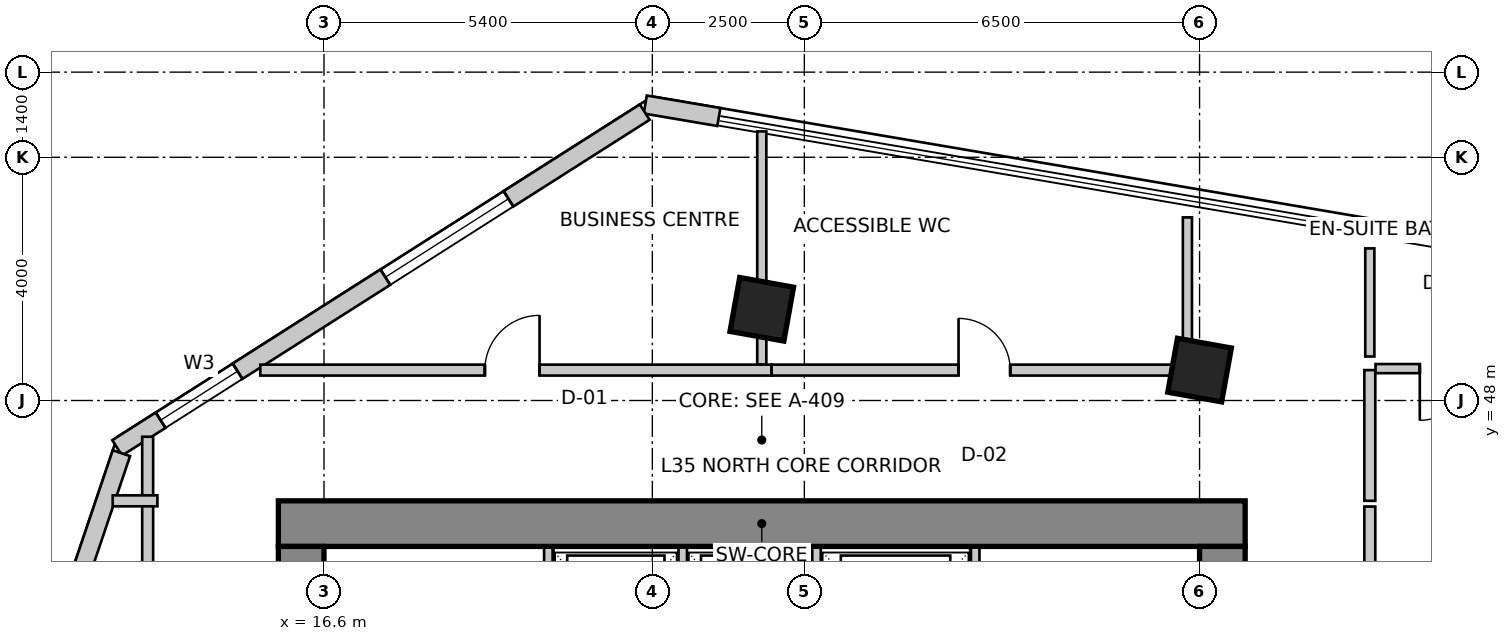
"""IFC4 building model, lengths in metres.
Left out: names, types, materials, properties, quantities, classifications, styles, units other than length and angle.
Written with IfcOpenShell. Run it as: python <this file> out.ifc"""

import sys

from ifc_helpers import new_model, si_unit, direction, frame, frame_2d, origin, origin_2d, place, context, subcontext, project, spatial, rectangle, extrude, source, transform, mapped, element, fill, save


model = new_model("IFC4")
c1 = context("Model", 3, precision=1e-05, world=origin(), true_north=direction((0.0, 1.0)))
c2 = subcontext(c1, "Body", "Model", "MODEL_VIEW")
j1 = project(units=[si_unit("LENGTHUNIT", "METRE"), si_unit("PLANEANGLEUNIT", "RADIAN")], contexts=[c1])
p1 = place(None, origin())
s1 = spatial("IfcSite", under=j1, at=p1, CompositionType="ELEMENT")
p2 = place(p1, origin())
s2 = spatial("IfcBuilding", under=s1, at=p2, CompositionType="ELEMENT")
p3 = place(p2, frame((0.0, 0.0, 143.0)))
s3 = spatial("IfcBuildingStorey", under=s2, at=p3, CompositionType="ELEMENT", Elevation=143.0)
p4 = place(p3, frame((15.85, 45.975, 0.0), z_axis=(0.0, 0.0, 1.0), x_axis=(1.0, 0.0, 0.0)))
e1 = element("IfcWall", 1, at=p4, inside=s3, PredefinedType="SHEAR", context=c2, shape_type="SweptSolid", body=[
    extrude(rectangle(XDim=15.9, YDim=0.75, at=frame_2d((7.95, 0.0))), origin(), (0.0, 0.0, 1.0), 3.6),
])
p5 = place(p3, frame((16.225, 34.2, 0.0), z_axis=(0.0, 0.0, 1.0), x_axis=(0.0, 1.0, 0.0)))
e2 = element("IfcWall", 2, at=p5, inside=s3, PredefinedType="SHEAR", context=c2, shape_type="SweptSolid", body=[
    extrude(rectangle(XDim=11.4, YDim=0.75, at=frame_2d((5.7, 0.0))), origin(), (0.0, 0.0, 1.0), 3.6),
])
m1 = source(origin(), c2, "Body", "SweptSolid", [
    extrude(rectangle(XDim=1.1, YDim=2.15, at=frame_2d((0.55, 1.075))), frame((0.0, 0.385, 0.0), z_axis=(0.0, -1.0, 0.0), x_axis=(1.0, 0.0, 0.0)), (0.0, 0.0, 1.0), 0.77),
])
p6 = place(p5, frame((7.15, 0.0, 0.0)))
e3 = element("IfcOpeningElement", 3, at=p6, cuts=e2, PredefinedType="OPENING", context=c2, shape_type="MappedRepresentation", body=[
    mapped(m1, transform((0.0, 0.0, 0.0), scale=1.0)),
])
p7 = place(p3, frame((31.375, 34.2, 0.0), z_axis=(0.0, 0.0, 1.0), x_axis=(0.0, 1.0, 0.0)))
e4 = element("IfcWall", 4, at=p7, inside=s3, PredefinedType="SHEAR", context=c2, shape_type="SweptSolid", body=[
    extrude(rectangle(XDim=11.4, YDim=0.75, at=frame_2d((5.7, 0.0))), origin(), (0.0, 0.0, 1.0), 3.6),
])
p8 = place(p7, frame((7.35, 0.0, 0.0)))
e5 = element("IfcOpeningElement", 5, at=p8, cuts=e4, PredefinedType="OPENING", context=c2, shape_type="MappedRepresentation", body=[
    mapped(m1, transform((0.0, 0.0, 0.0), scale=1.0)),
])
m2 = source(origin(), c2, "Body", "SweptSolid", [
    extrude(rectangle(XDim=0.9, YDim=0.9, at=origin_2d()), origin(), (0.0, 0.0, 1.0), 3.6),
])
for number, where, z_axis, x_axis in (
    (6, (23.8, 49.5, 0.0), (0.0, 0.0, 1.0), (0.984, -0.177, 0.0)),
    (7, (31.0, 48.5, 0.0), (0.0, 0.0, 1.0), (0.984, -0.177, 0.0)),
):
    element("IfcColumn", number, at=place(p3, frame(where, z_axis=z_axis, x_axis=x_axis)), inside=s3, PredefinedType="COLUMN", context=c2, shape_type="MappedRepresentation", body=[
        mapped(m2, transform((0.0, 0.0, 0.0), scale=1.0)),
    ])
p9 = place(p3, frame((23.094, 52.662, 0.0), z_axis=(0.0, 0.0, 1.0), x_axis=(-0.985845658291, 0.167655414553, 0.0)))
e8 = element("IfcWall", 8, at=p9, inside=s3, PredefinedType="SOLIDWALL", context=c2, shape_type="SweptSolid", body=[
    extrude(rectangle(XDim=1.228, YDim=0.3, at=frame_2d((0.614, 0.0))), origin(), (0.0, 0.0, 1.0), 3.35),
])
p10 = place(p3, frame((21.875, 52.742, 0.0), z_axis=(0.0, 0.0, 1.0), x_axis=(-0.843662465249, -0.536873956092, 0.0)))
e9 = element("IfcWall", 9, at=p10, inside=s3, PredefinedType="SOLIDWALL", context=c2, shape_type="SweptSolid", body=[
    extrude(rectangle(XDim=10.284, YDim=0.3, at=frame_2d((5.142, 0.0))), origin(), (0.0, 0.0, 1.0), 3.35),
])
m3 = source(origin(), c2, "Body", "SweptSolid", [
    extrude(rectangle(XDim=2.4, YDim=2.2, at=frame_2d((1.2, 1.1))), frame((0.0, 0.16, 0.0), z_axis=(0.0, -1.0, 0.0), x_axis=(1.0, 0.0, 0.0)), (0.0, 0.0, 1.0), 0.32),
])
p11 = place(p10, frame((2.656, 0.0, 0.85)))
e10 = element("IfcOpeningElement", 10, at=p11, cuts=e9, PredefinedType="OPENING", context=c2, shape_type="MappedRepresentation", body=[
    mapped(m3, transform((0.0, 0.0, 0.0), scale=1.0)),
])
m4 = source(origin(), c2, "Body", "SweptSolid", [
    extrude(rectangle(XDim=1.5, YDim=1.8, at=frame_2d((0.75, 0.9))), frame((0.0, 0.16, 0.0), z_axis=(0.0, -1.0, 0.0), x_axis=(1.0, 0.0, 0.0)), (0.0, 0.0, 1.0), 0.32),
])
p12 = place(p10, frame((7.937, 0.0, 0.85)))
e11 = element("IfcOpeningElement", 11, at=p12, cuts=e9, PredefinedType="OPENING", context=c2, shape_type="MappedRepresentation", body=[
    mapped(m4, transform((0.0, 0.0, 0.0), scale=1.0)),
])
p13 = place(p3, frame((13.269, 47.134, 0.0), z_axis=(0.0, 0.0, 1.0), x_axis=(-0.319929773322, -0.947441259468, 0.0)))
e12 = element("IfcWall", 12, at=p13, inside=s3, PredefinedType="SOLIDWALL", context=c2, shape_type="SweptSolid", body=[
    extrude(rectangle(XDim=16.134, YDim=0.3, at=frame_2d((8.067, 0.0))), origin(), (0.0, 0.0, 1.0), 3.35),
])
m5 = source(origin(), c2, "Body", "SweptSolid", [
    extrude(rectangle(XDim=2.1, YDim=2.0, at=frame_2d((1.05, 1.0))), frame((0.0, 0.16, 0.0), z_axis=(0.0, -1.0, 0.0), x_axis=(1.0, 0.0, 0.0)), (0.0, 0.0, 1.0), 0.32),
])
p14 = place(p13, frame((2.426, 0.0, 0.85)))
e13 = element("IfcOpeningElement", 13, at=p14, cuts=e12, PredefinedType="OPENING", context=c2, shape_type="MappedRepresentation", body=[
    mapped(m5, transform((0.0, 0.0, 0.0), scale=1.0)),
])
p15 = place(p13, frame((7.211, 0.0, 0.85)))
e14 = element("IfcOpeningElement", 14, at=p15, cuts=e12, PredefinedType="OPENING", context=c2, shape_type="MappedRepresentation", body=[
    mapped(m3, transform((0.0, 0.0, 0.0), scale=1.0)),
])
p16 = place(p13, frame((12.296, 0.0, 0.85)))
e15 = element("IfcOpeningElement", 15, at=p16, cuts=e12, PredefinedType="OPENING", context=c2, shape_type="MappedRepresentation", body=[
    mapped(m5, transform((0.0, 0.0, 0.0), scale=1.0)),
])
for number, where, z_axis, x_axis in (
    (16, (20.29, 43.28, 0.0), (0.0, 0.0, 1.0), (0.0, 1.0, 0.0)),
    (17, (27.31, 43.28, 0.0), (0.0, 0.0, 1.0), (0.0, 1.0, 0.0)),
):
    element("IfcWall", number, at=place(p3, frame(where, z_axis=z_axis, x_axis=x_axis)), inside=s3, PredefinedType="SOLIDWALL", context=c2, shape_type="SweptSolid", body=[
        extrude(rectangle(XDim=2.3, YDim=0.14, at=frame_2d((1.15, 0.0))), origin(), (0.0, 0.0, 1.0), 3.35),
    ])
for number, where, z_axis, x_axis in (
    (18, (22.5, 43.02, 0.0), (0.0, 0.0, 1.0), (0.0, 1.0, 0.0)),
    (19, (24.7, 43.02, 0.0), (0.0, 0.0, 1.0), (0.0, 1.0, 0.0)),
):
    element("IfcWall", number, at=place(p3, frame(where, z_axis=z_axis, x_axis=x_axis)), inside=s3, PredefinedType="SOLIDWALL", context=c2, shape_type="SweptSolid", body=[
        extrude(rectangle(XDim=2.56, YDim=0.14, at=frame_2d((1.28, 0.0))), origin(), (0.0, 0.0, 1.0), 3.35),
    ])
p17 = place(p3, frame((13.7, 33.544, 0.0), z_axis=(0.0, 0.0, 1.0), x_axis=(0.0, 1.0, 0.0)))
e20 = element("IfcWall", 20, at=p17, inside=s3, PredefinedType="PARTITIONING", context=c2, shape_type="SweptSolid", body=[
    extrude(rectangle(XDim=13.86, YDim=0.18, at=frame_2d((6.93, 0.0))), origin(), (0.0, 0.0, 1.0), 2.492),
])
m6 = source(origin(), c2, "Body", "SweptSolid", [
    extrude(rectangle(XDim=0.9, YDim=2.15, at=frame_2d((0.45, 1.075))), frame((0.0, 0.1, 0.0), z_axis=(0.0, -1.0, 0.0), x_axis=(1.0, 0.0, 0.0)), (0.0, 0.0, 1.0), 0.2),
])
p18 = place(p17, frame((4.253, 0.0, 0.0)))
e21 = element("IfcOpeningElement", 21, at=p18, cuts=e20, PredefinedType="OPENING", context=c2, shape_type="MappedRepresentation", body=[
    mapped(m6, transform((0.0, 0.0, 0.0), scale=1.0)),
])
p19 = place(p3, frame((13.86, 46.35, 0.0), z_axis=(0.0, 0.0, 1.0), x_axis=(-1.0, 0.0, 0.0)))
e22 = element("IfcWall", 22, at=p19, inside=s3, PredefinedType="PARTITIONING", context=c2, shape_type="SweptSolid", body=[
    extrude(rectangle(XDim=0.735, YDim=0.18, at=frame_2d((0.367, 0.0))), origin(), (0.0, 0.0, 1.0), 3.35),
])
p20 = place(p3, frame((15.552, 48.5, 0.0), z_axis=(0.0, 0.0, 1.0), x_axis=(1.0, 0.0, 0.0)))
e23 = element("IfcWall", 23, at=p20, inside=s3, PredefinedType="PARTITIONING", context=c2, shape_type="SweptSolid", body=[
    extrude(rectangle(XDim=8.407, YDim=0.18, at=frame_2d((4.204, 0.0))), origin(), (0.0, 0.0, 1.0), 3.034),
])
p21 = place(p20, frame((3.693, 0.0, 0.0)))
e24 = element("IfcOpeningElement", 24, at=p21, cuts=e23, PredefinedType="OPENING", context=c2, shape_type="MappedRepresentation", body=[
    mapped(m6, transform((0.0, 0.0, 0.0), scale=1.0)),
])
p22 = place(p3, frame((23.962, 48.5, 0.0), z_axis=(0.0, 0.0, 1.0), x_axis=(1.0, 0.0, 0.0)))
e25 = element("IfcWall", 25, at=p22, inside=s3, PredefinedType="PARTITIONING", context=c2, shape_type="SweptSolid", body=[
    extrude(rectangle(XDim=6.998, YDim=0.18, at=frame_2d((3.499, 0.0))), origin(), (0.0, 0.0, 1.0), 2.492),
])
m7 = source(origin(), c2, "Body", "SweptSolid", [
    extrude(rectangle(XDim=0.85, YDim=2.15, at=frame_2d((0.425, 1.075))), frame((0.0, 0.1, 0.0), z_axis=(0.0, -1.0, 0.0), x_axis=(1.0, 0.0, 0.0)), (0.0, 0.0, 1.0), 0.2),
])
p23 = place(p22, frame((3.074, 0.0, 0.0)))
e26 = element("IfcOpeningElement", 26, at=p23, cuts=e25, PredefinedType="OPENING", context=c2, shape_type="MappedRepresentation", body=[
    mapped(m7, transform((0.0, 0.0, 0.0), scale=1.0)),
])
p24 = place(p3, frame((33.8, 48.5, 0.0), z_axis=(0.0, 0.0, 1.0), x_axis=(0.0, -1.0, 0.0)))
e27 = element("IfcWall", 27, at=p24, inside=s3, PredefinedType="PARTITIONING", context=c2, shape_type="SweptSolid", body=[
    extrude(rectangle(XDim=2.15, YDim=0.18, at=frame_2d((1.075, 0.0))), origin(), (0.0, 0.0, 1.0), 2.492),
])
p25 = place(p3, frame((33.8, 46.256, 0.0), z_axis=(0.0, 0.0, 1.0), x_axis=(0.0, -1.0, 0.0)))
e28 = element("IfcWall", 28, at=p25, inside=s3, PredefinedType="PARTITIONING", context=c2, shape_type="SweptSolid", body=[
    extrude(rectangle(XDim=8.416, YDim=0.18, at=frame_2d((4.208, 0.0))), origin(), (0.0, 0.0, 1.0), 2.922),
])
p26 = place(p3, frame((23.8, 52.425, 0.0), z_axis=(0.0, 0.0, 1.0), x_axis=(0.0, -1.0, 0.0)))
e29 = element("IfcWall", 29, at=p26, inside=s3, PredefinedType="PARTITIONING", context=c2, shape_type="SweptSolid", body=[
    extrude(rectangle(XDim=3.831, YDim=0.15, at=frame_2d((1.916, 0.0))), origin(), (0.0, 0.0, 1.0), 2.492),
])
p27 = place(p3, frame((36.2, 48.524, 0.0), z_axis=(0.0, 0.0, 1.0), x_axis=(-1.0, 0.0, 0.0)))
e30 = element("IfcWall", 30, at=p27, inside=s3, PredefinedType="PARTITIONING", context=c2, shape_type="SweptSolid", body=[
    extrude(rectangle(XDim=2.306, YDim=0.15, at=frame_2d((1.153, 0.0))), origin(), (0.0, 0.0, 1.0), 3.35),
])
m8 = source(origin(), c2, "Body", "SweptSolid", [
    extrude(rectangle(XDim=0.85, YDim=2.15, at=frame_2d((0.425, 1.075))), frame((0.0, 0.085, 0.0), z_axis=(0.0, -1.0, 0.0), x_axis=(1.0, 0.0, 0.0)), (0.0, 0.0, 1.0), 0.17),
])
p28 = place(p27, frame((0.728, 0.0, 0.0)))
e31 = element("IfcOpeningElement", 31, at=p28, cuts=e30, PredefinedType="OPENING", context=c2, shape_type="MappedRepresentation", body=[
    mapped(m8, transform((0.0, 0.0, 0.0), scale=1.0)),
])
p29 = place(p3, frame((30.8, 51.011, 0.0), z_axis=(0.0, 0.0, 1.0), x_axis=(0.0, -1.0, 0.0)))
e32 = element("IfcWall", 32, at=p29, inside=s3, PredefinedType="PARTITIONING", context=c2, shape_type="SweptSolid", body=[
    extrude(rectangle(XDim=2.292, YDim=0.15, at=frame_2d((1.146, 0.0))), origin(), (0.0, 0.0, 1.0), 3.35),
])
p30 = place(p3, frame((33.8, 48.723, 0.0), z_axis=(0.0, 0.0, 1.0), x_axis=(0.0, 1.0, 0.0)))
e33 = element("IfcWall", 33, at=p30, inside=s3, PredefinedType="PARTITIONING", context=c2, shape_type="SweptSolid", body=[
    extrude(rectangle(XDim=1.778, YDim=0.15, at=frame_2d((0.889, 0.0))), origin(), (0.0, 0.0, 1.0), 3.35),
])
m9 = source(origin(), c2, "Body", "SweptSolid", [
    extrude(rectangle(XDim=2.4, YDim=2.2, at=frame_2d((1.2, 1.1))), frame((0.0, -0.015, 0.0), z_axis=(0.0, -1.0, 0.0), x_axis=(1.0, 0.0, 0.0)), (0.0, 0.0, 1.0), 0.06),
])
p31 = place(p11, origin())
e34 = element("IfcWindow", 34, at=p31, inside=s3, PartitioningType="SINGLE_PANEL", PredefinedType="WINDOW", context=c2, shape_type="MappedRepresentation", body=[
    mapped(m9, transform((0.0, 0.0, 0.0), scale=1.0)),
])
fill(e10, e34)
m10 = source(origin(), c2, "Body", "SweptSolid", [
    extrude(rectangle(XDim=1.5, YDim=1.8, at=frame_2d((0.75, 0.9))), frame((0.0, -0.015, 0.0), z_axis=(0.0, -1.0, 0.0), x_axis=(1.0, 0.0, 0.0)), (0.0, 0.0, 1.0), 0.06),
])
p32 = place(p12, origin())
e35 = element("IfcWindow", 35, at=p32, inside=s3, PartitioningType="SINGLE_PANEL", PredefinedType="WINDOW", context=c2, shape_type="MappedRepresentation", body=[
    mapped(m10, transform((0.0, 0.0, 0.0), scale=1.0)),
])
fill(e11, e35)
m11 = source(origin(), c2, "Body", "SweptSolid", [
    extrude(rectangle(XDim=0.9, YDim=2.15, at=frame_2d((0.45, 1.075))), frame((0.0, 0.025, 0.0), z_axis=(0.0, -1.0, 0.0), x_axis=(1.0, 0.0, 0.0)), (0.0, 0.0, 1.0), 0.05),
])
p33 = place(p21, origin())
e36 = element("IfcDoor", 36, at=p33, inside=s3, OperationType="SINGLE_SWING_RIGHT", PredefinedType="DOOR", context=c2, shape_type="MappedRepresentation", body=[
    mapped(m11, transform((0.0, 0.0, 0.0), scale=1.0)),
])
fill(e24, e36)
m12 = source(origin(), c2, "Body", "SweptSolid", [
    extrude(rectangle(XDim=0.85, YDim=2.15, at=frame_2d((0.425, 1.075))), frame((0.0, 0.025, 0.0), z_axis=(0.0, -1.0, 0.0), x_axis=(1.0, 0.0, 0.0)), (0.0, 0.0, 1.0), 0.05),
])
p34 = place(p23, origin())
e37 = element("IfcDoor", 37, at=p34, inside=s3, OperationType="SINGLE_SWING_LEFT", PredefinedType="DOOR", context=c2, shape_type="MappedRepresentation", body=[
    mapped(m12, transform((0.0, 0.0, 0.0), scale=1.0)),
])
fill(e26, e37)
p35 = place(p28, origin())
e38 = element("IfcDoor", 38, at=p35, inside=s3, OperationType="SINGLE_SWING_RIGHT", PredefinedType="DOOR", context=c2, shape_type="MappedRepresentation", body=[
    mapped(m12, transform((0.0, 0.0, 0.0), scale=1.0)),
])
fill(e31, e38)
save(model, sys.argv[1])
